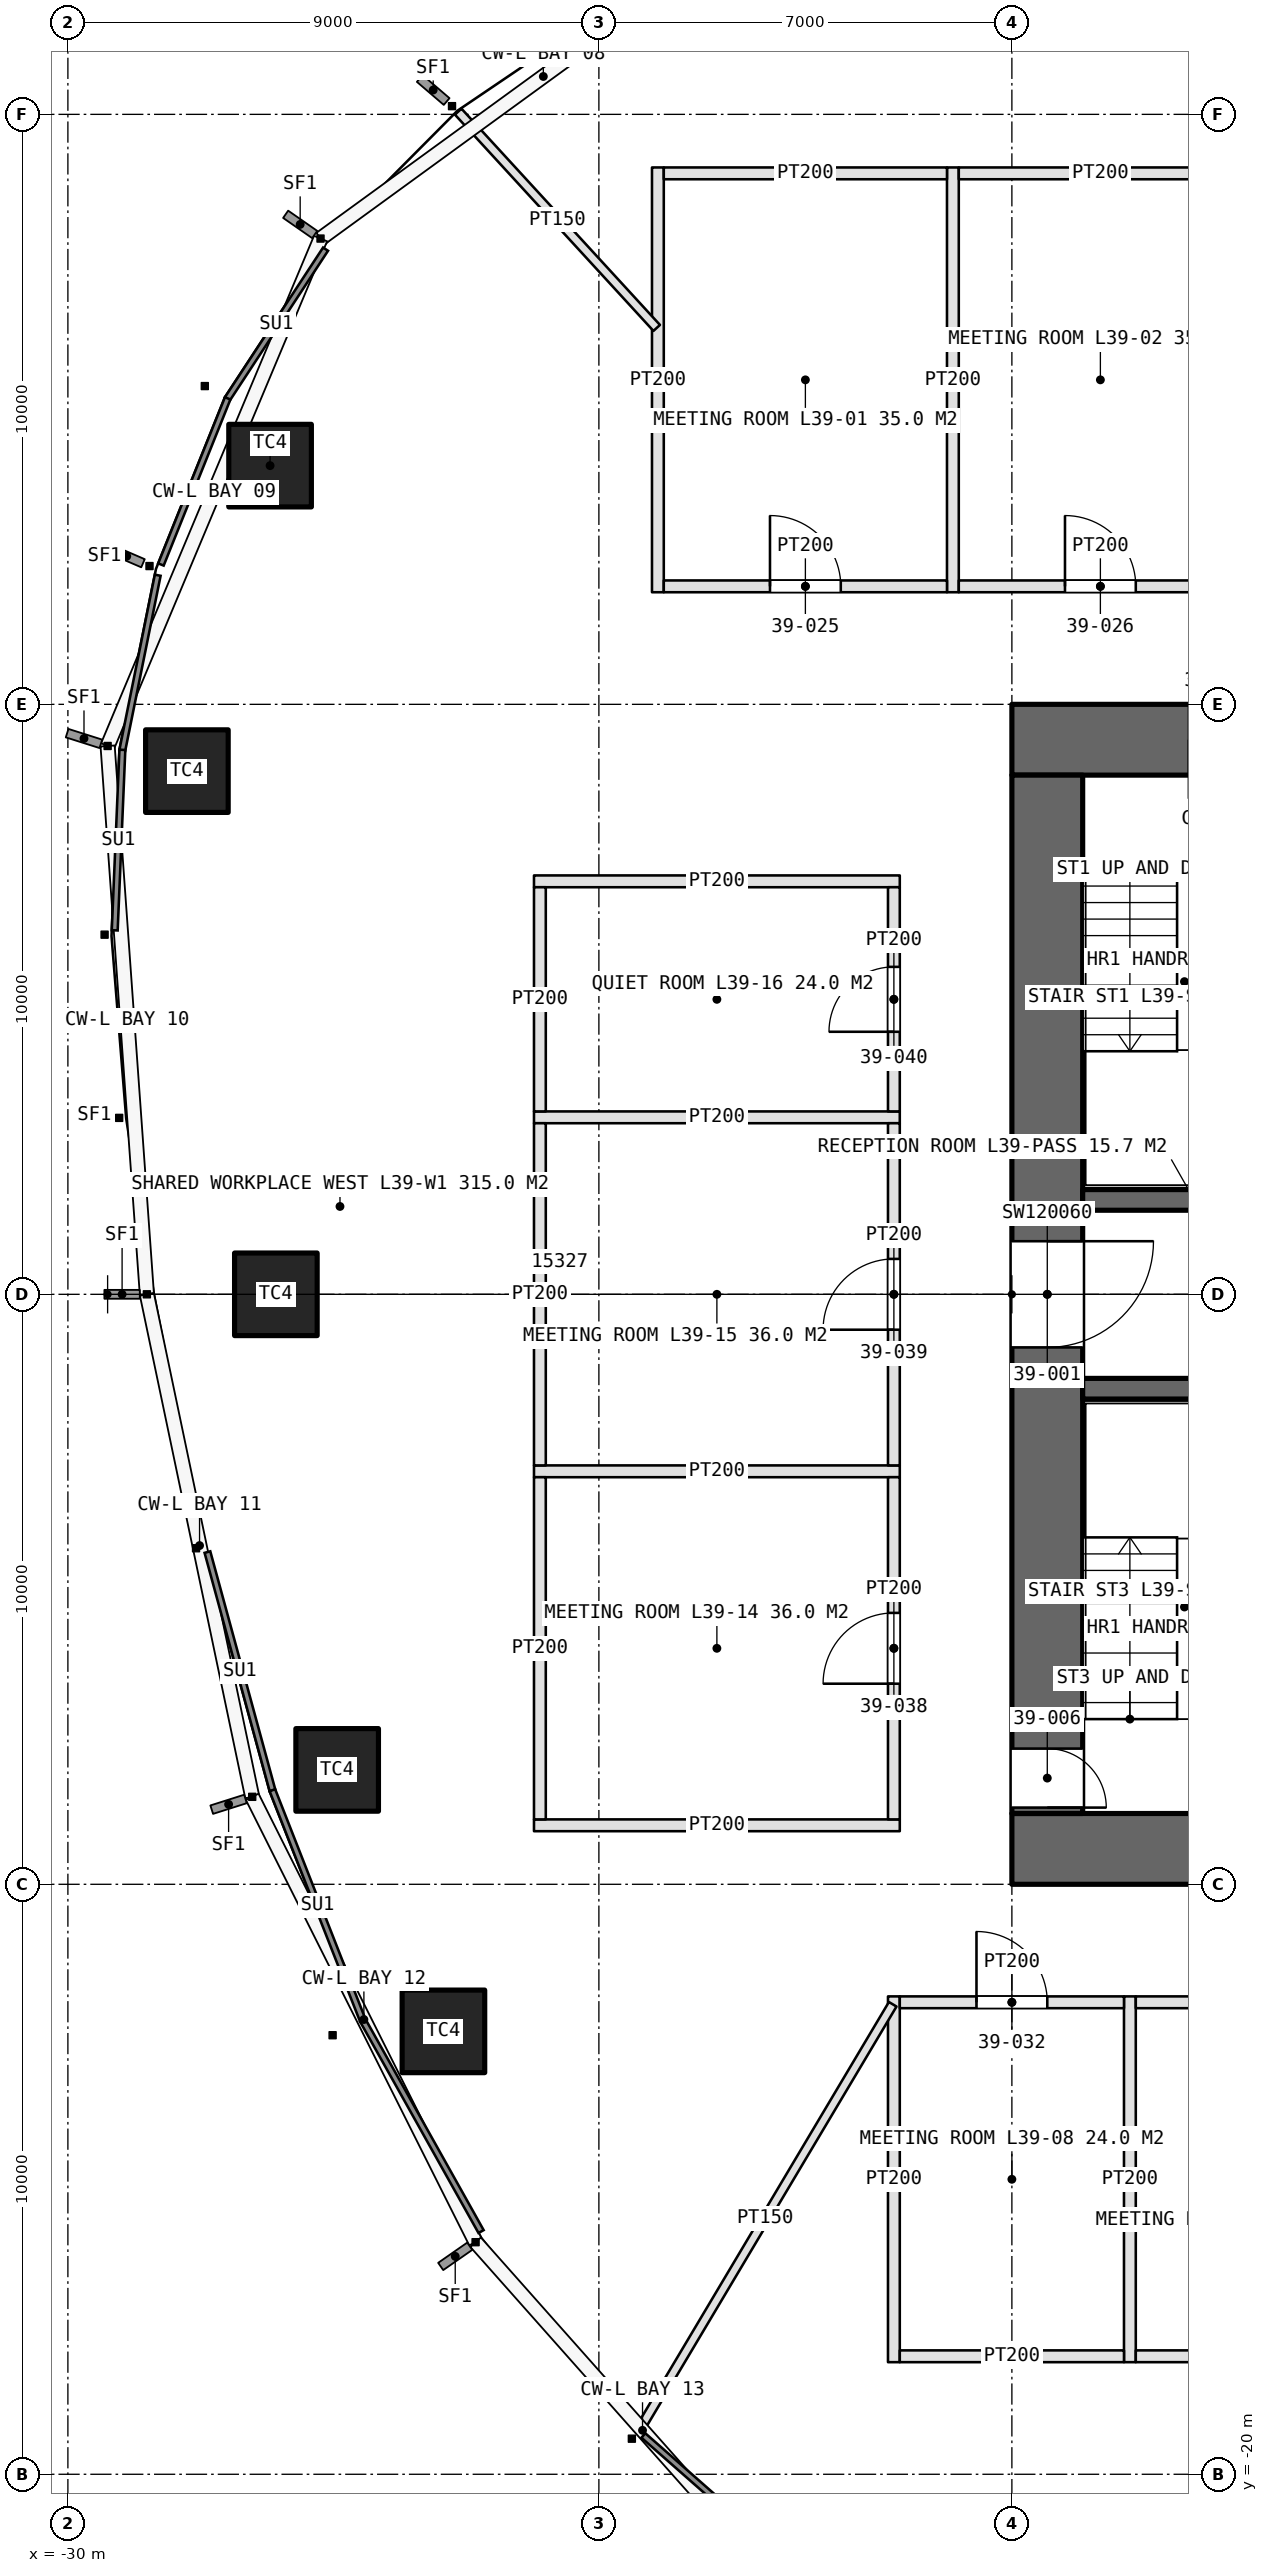
"""IFC4 building model, lengths in metres.
Left out: names, types, materials, properties, quantities, classifications, styles, units other than length and angle.
Written with IfcOpenShell. Run it as: python <this file> out.ifc"""

import sys

from ifc_helpers import new_model, si_unit, direction, frame, frame_2d, origin, origin_2d, place, context, subcontext, project, spatial, rectangle, extrude, element, fill, save


model = new_model("IFC4")
c1 = context("Model", 3, precision=1e-05, world=origin(), true_north=direction((0.0, 1.0)))
c2 = subcontext(c1, "Body", "Model", "MODEL_VIEW")
j1 = project(units=[si_unit("LENGTHUNIT", "METRE"), si_unit("PLANEANGLEUNIT", "RADIAN")], contexts=[c1])
p1 = place(None, origin())
s1 = spatial("IfcSite", under=j1, at=p1, CompositionType="ELEMENT")
p2 = place(p1, origin())
s2 = spatial("IfcBuilding", under=s1, at=p2, CompositionType="ELEMENT")
p3 = place(p2, frame((0.0, 0.0, 180.6)))
s3 = spatial("IfcBuildingStorey", under=s2, at=p3, CompositionType="ELEMENT", Elevation=180.6)
p4 = place(p3, frame((-14.0, -9.4, 0.0), z_axis=(0.0, 0.0, 1.0), x_axis=(1.0, 0.0, 0.0)))
e1 = element("IfcWall", 1, at=p4, inside=s3, PredefinedType="SHEAR", context=c2, shape_type="SweptSolid", body=[
    extrude(rectangle(XDim=28.0, YDim=1.2, at=frame_2d((14.0, 0.0))), origin(), (0.0, 0.0, 1.0), 4.2),
])
p5 = place(p4, frame((13.1, 0.0, 0.0)))
e2 = element("IfcOpeningElement", 2, at=p5, cuts=e1, PredefinedType="OPENING", context=c2, shape_type="SweptSolid", body=[
    extrude(rectangle(XDim=1.8, YDim=2.4, at=frame_2d((0.9, 1.2))), frame((0.0, 0.61, 0.0), z_axis=(0.0, -1.0, 0.0), x_axis=(1.0, 0.0, 0.0)), (0.0, 0.0, 1.0), 1.22),
])
p6 = place(p4, frame((22.9, 0.0, 0.0)))
e3 = element("IfcOpeningElement", 3, at=p6, cuts=e1, PredefinedType="OPENING", context=c2, shape_type="SweptSolid", body=[
    extrude(rectangle(XDim=2.2, YDim=2.7, at=frame_2d((1.1, 1.35))), frame((0.0, 0.61, 0.0), z_axis=(0.0, -1.0, 0.0), x_axis=(1.0, 0.0, 0.0)), (0.0, 0.0, 1.0), 1.22),
])
p7 = place(p3, frame((14.0, 9.4, 0.0), z_axis=(0.0, 0.0, 1.0), x_axis=(-1.0, 0.0, 0.0)))
e4 = element("IfcWall", 4, at=p7, inside=s3, PredefinedType="SHEAR", context=c2, shape_type="SweptSolid", body=[
    extrude(rectangle(XDim=28.0, YDim=1.2, at=frame_2d((14.0, 0.0))), origin(), (0.0, 0.0, 1.0), 4.2),
])
p8 = place(p7, frame((24.0, 0.0, 0.0)))
e5 = element("IfcOpeningElement", 5, at=p8, cuts=e4, PredefinedType="OPENING", context=c2, shape_type="SweptSolid", body=[
    extrude(rectangle(XDim=1.0, YDim=2.4, at=frame_2d((0.5, 1.2))), frame((0.0, 0.61, 0.0), z_axis=(0.0, -1.0, 0.0), x_axis=(1.0, 0.0, 0.0)), (0.0, 0.0, 1.0), 1.22),
])
p9 = place(p7, frame((13.1, 0.0, 0.0)))
e6 = element("IfcOpeningElement", 6, at=p9, cuts=e4, PredefinedType="OPENING", context=c2, shape_type="SweptSolid", body=[
    extrude(rectangle(XDim=1.8, YDim=2.4, at=frame_2d((0.9, 1.2))), frame((0.0, 0.61, 0.0), z_axis=(0.0, -1.0, 0.0), x_axis=(1.0, 0.0, 0.0)), (0.0, 0.0, 1.0), 1.22),
])
p10 = place(p3, frame((-13.4, 8.8, 0.0), z_axis=(0.0, 0.0, 1.0), x_axis=(0.0, -1.0, 0.0)))
e7 = element("IfcWall", 7, at=p10, inside=s3, PredefinedType="SHEAR", context=c2, shape_type="SweptSolid", body=[
    extrude(rectangle(XDim=17.6, YDim=1.2, at=frame_2d((8.8, 0.0))), origin(), (0.0, 0.0, 1.0), 4.2),
])
p11 = place(p10, frame((7.9, 0.0, 0.0)))
e8 = element("IfcOpeningElement", 8, at=p11, cuts=e7, PredefinedType="OPENING", context=c2, shape_type="SweptSolid", body=[
    extrude(rectangle(XDim=1.8, YDim=2.4, at=frame_2d((0.9, 1.2))), frame((0.0, 0.61, 0.0), z_axis=(0.0, -1.0, 0.0), x_axis=(1.0, 0.0, 0.0)), (0.0, 0.0, 1.0), 1.22),
])
p12 = place(p10, frame((16.5, 0.0, 0.0)))
e9 = element("IfcOpeningElement", 9, at=p12, cuts=e7, PredefinedType="OPENING", context=c2, shape_type="SweptSolid", body=[
    extrude(rectangle(XDim=1.0, YDim=2.4, at=frame_2d((0.5, 1.2))), frame((0.0, 0.61, 0.0), z_axis=(0.0, -1.0, 0.0), x_axis=(1.0, 0.0, 0.0)), (0.0, 0.0, 1.0), 1.22),
])
for number, where, z_axis, x_axis in (
    (10, (-12.8, 1.6, 0.0), (0.0, 0.0, 1.0), (1.0, 0.0, 0.0)),
    (11, (-12.8, -1.6, 0.0), (0.0, 0.0, 1.0), (1.0, 0.0, 0.0)),
):
    element("IfcWall", number, at=place(p3, frame(where, z_axis=z_axis, x_axis=x_axis)), inside=s3, PredefinedType="SHEAR", context=c2, shape_type="SweptSolid", body=[
        extrude(rectangle(XDim=5.6, YDim=0.35, at=frame_2d((2.8, 0.0))), origin(), (0.0, 0.0, 1.0), 4.2),
    ])
for number, where, z_axis, x_axis in (
    (12, (-26.573, 14.046, 0.0), (0.0, 0.0, 1.0), (1.0, 0.0, 0.0)),
    (13, (-27.983, 8.868, 0.0), (0.0, 0.0, 1.0), (1.0, 0.0, 0.0)),
    (14, (-26.475, 0.0, 0.0), (0.0, 0.0, 1.0), (1.0, 0.0, 0.0)),
    (15, (-25.436, -8.061, 0.0), (0.0, 0.0, 1.0), (1.0, 0.0, 0.0)),
    (16, (-23.635, -12.493, 0.0), (0.0, 0.0, 1.0), (1.0, 0.0, 0.0)),
):
    element("IfcColumn", number, at=place(p3, frame(where, z_axis=z_axis, x_axis=x_axis)), inside=s3, PredefinedType="COLUMN", context=c2, shape_type="SweptSolid", body=[
        extrude(rectangle(XDim=1.4, YDim=1.4, at=origin_2d()), origin(), (0.0, 0.0, 1.0), 4.2),
    ])
for number, where, z_axis, x_axis in (
    (17, (-20.0, 11.9, 0.0), (0.0, 0.0, 1.0), (0.0, 1.0, 0.0)),
    (18, (-15.0, 11.9, 0.0), (0.0, 0.0, 1.0), (0.0, 1.0, 0.0)),
):
    element("IfcWall", number, at=place(p3, frame(where, z_axis=z_axis, x_axis=x_axis)), inside=s3, PredefinedType="PARTITIONING", context=c2, shape_type="SweptSolid", body=[
        extrude(rectangle(XDim=7.2, YDim=0.2, at=frame_2d((3.6, 0.0))), origin(), (0.0, 0.0, 1.0), 3.0),
    ])
p13 = place(p3, frame((-19.9, 12.0, 0.0), z_axis=(0.0, 0.0, 1.0), x_axis=(1.0, 0.0, 0.0)))
e19 = element("IfcWall", 19, at=p13, inside=s3, PredefinedType="PARTITIONING", context=c2, shape_type="SweptSolid", body=[
    extrude(rectangle(XDim=4.8, YDim=0.2, at=frame_2d((2.4, 0.0))), origin(), (0.0, 0.0, 1.0), 3.0),
])
p14 = place(p13, frame((1.8, 0.0, 0.0)))
e20 = element("IfcOpeningElement", 20, at=p14, cuts=e19, PredefinedType="OPENING", context=c2, shape_type="SweptSolid", body=[
    extrude(rectangle(XDim=1.2, YDim=2.4, at=frame_2d((0.6, 1.2))), frame((0.0, 0.11, 0.0), z_axis=(0.0, -1.0, 0.0), x_axis=(1.0, 0.0, 0.0)), (0.0, 0.0, 1.0), 0.22),
])
p15 = place(p3, frame((-19.9, 19.0, 0.0), z_axis=(0.0, 0.0, 1.0), x_axis=(1.0, 0.0, 0.0)))
e21 = element("IfcWall", 21, at=p15, inside=s3, PredefinedType="PARTITIONING", context=c2, shape_type="SweptSolid", body=[
    extrude(rectangle(XDim=4.8, YDim=0.2, at=frame_2d((2.4, 0.0))), origin(), (0.0, 0.0, 1.0), 3.0),
])
p16 = place(p3, frame((-14.9, 12.0, 0.0), z_axis=(0.0, 0.0, 1.0), x_axis=(1.0, 0.0, 0.0)))
e22 = element("IfcWall", 22, at=p16, inside=s3, PredefinedType="PARTITIONING", context=c2, shape_type="SweptSolid", body=[
    extrude(rectangle(XDim=4.8, YDim=0.2, at=frame_2d((2.4, 0.0))), origin(), (0.0, 0.0, 1.0), 3.0),
])
p17 = place(p16, frame((1.8, 0.0, 0.0)))
e23 = element("IfcOpeningElement", 23, at=p17, cuts=e22, PredefinedType="OPENING", context=c2, shape_type="SweptSolid", body=[
    extrude(rectangle(XDim=1.2, YDim=2.4, at=frame_2d((0.6, 1.2))), frame((0.0, 0.11, 0.0), z_axis=(0.0, -1.0, 0.0), x_axis=(1.0, 0.0, 0.0)), (0.0, 0.0, 1.0), 0.22),
])
p18 = place(p3, frame((-14.9, 19.0, 0.0), z_axis=(0.0, 0.0, 1.0), x_axis=(1.0, 0.0, 0.0)))
e24 = element("IfcWall", 24, at=p18, inside=s3, PredefinedType="PARTITIONING", context=c2, shape_type="SweptSolid", body=[
    extrude(rectangle(XDim=4.8, YDim=0.2, at=frame_2d((2.4, 0.0))), origin(), (0.0, 0.0, 1.0), 3.0),
])
for number, where, z_axis, x_axis in (
    (25, (-16.0, -11.9, 0.0), (0.0, 0.0, 1.0), (0.0, -1.0, 0.0)),
    (26, (-12.0, -11.9, 0.0), (0.0, 0.0, 1.0), (0.0, -1.0, 0.0)),
):
    element("IfcWall", number, at=place(p3, frame(where, z_axis=z_axis, x_axis=x_axis)), inside=s3, PredefinedType="PARTITIONING", context=c2, shape_type="SweptSolid", body=[
        extrude(rectangle(XDim=6.2, YDim=0.2, at=frame_2d((3.1, 0.0))), origin(), (0.0, 0.0, 1.0), 3.0),
    ])
p19 = place(p3, frame((-15.9, -12.0, 0.0), z_axis=(0.0, 0.0, 1.0), x_axis=(1.0, 0.0, 0.0)))
e27 = element("IfcWall", 27, at=p19, inside=s3, PredefinedType="PARTITIONING", context=c2, shape_type="SweptSolid", body=[
    extrude(rectangle(XDim=3.8, YDim=0.2, at=frame_2d((1.9, 0.0))), origin(), (0.0, 0.0, 1.0), 3.0),
])
p20 = place(p19, frame((1.3, 0.0, 0.0)))
e28 = element("IfcOpeningElement", 28, at=p20, cuts=e27, PredefinedType="OPENING", context=c2, shape_type="SweptSolid", body=[
    extrude(rectangle(XDim=1.2, YDim=2.4, at=frame_2d((0.6, 1.2))), frame((0.0, 0.11, 0.0), z_axis=(0.0, -1.0, 0.0), x_axis=(1.0, 0.0, 0.0)), (0.0, 0.0, 1.0), 0.22),
])
p21 = place(p3, frame((-15.9, -18.0, 0.0), z_axis=(0.0, 0.0, 1.0), x_axis=(1.0, 0.0, 0.0)))
e29 = element("IfcWall", 29, at=p21, inside=s3, PredefinedType="PARTITIONING", context=c2, shape_type="SweptSolid", body=[
    extrude(rectangle(XDim=3.8, YDim=0.2, at=frame_2d((1.9, 0.0))), origin(), (0.0, 0.0, 1.0), 3.0),
])
p22 = place(p3, frame((-11.9, -12.0, 0.0), z_axis=(0.0, 0.0, 1.0), x_axis=(1.0, 0.0, 0.0)))
e30 = element("IfcWall", 30, at=p22, inside=s3, PredefinedType="PARTITIONING", context=c2, shape_type="SweptSolid", body=[
    extrude(rectangle(XDim=3.8, YDim=0.2, at=frame_2d((1.9, 0.0))), origin(), (0.0, 0.0, 1.0), 3.0),
])
p23 = place(p22, frame((1.3, 0.0, 0.0)))
e31 = element("IfcOpeningElement", 31, at=p23, cuts=e30, PredefinedType="OPENING", context=c2, shape_type="SweptSolid", body=[
    extrude(rectangle(XDim=1.2, YDim=2.4, at=frame_2d((0.6, 1.2))), frame((0.0, 0.11, 0.0), z_axis=(0.0, -1.0, 0.0), x_axis=(1.0, 0.0, 0.0)), (0.0, 0.0, 1.0), 0.22),
])
p24 = place(p3, frame((-11.9, -18.0, 0.0), z_axis=(0.0, 0.0, 1.0), x_axis=(1.0, 0.0, 0.0)))
e32 = element("IfcWall", 32, at=p24, inside=s3, PredefinedType="PARTITIONING", context=c2, shape_type="SweptSolid", body=[
    extrude(rectangle(XDim=3.8, YDim=0.2, at=frame_2d((1.9, 0.0))), origin(), (0.0, 0.0, 1.0), 3.0),
])
for number, where, z_axis, x_axis in (
    (33, (-15.9, -9.0, 0.0), (0.0, 0.0, 1.0), (-1.0, 0.0, 0.0)),
    (34, (-15.9, -3.0, 0.0), (0.0, 0.0, 1.0), (-1.0, 0.0, 0.0)),
    (35, (-15.9, 3.0, 0.0), (0.0, 0.0, 1.0), (-1.0, 0.0, 0.0)),
    (36, (-15.9, 7.0, 0.0), (0.0, 0.0, 1.0), (-1.0, 0.0, 0.0)),
):
    element("IfcWall", number, at=place(p3, frame(where, z_axis=z_axis, x_axis=x_axis)), inside=s3, PredefinedType="PARTITIONING", context=c2, shape_type="SweptSolid", body=[
        extrude(rectangle(XDim=6.2, YDim=0.2, at=frame_2d((3.1, 0.0))), origin(), (0.0, 0.0, 1.0), 3.0),
    ])
p25 = place(p3, frame((-16.0, -8.9, 0.0), z_axis=(0.0, 0.0, 1.0), x_axis=(0.0, 1.0, 0.0)))
e37 = element("IfcWall", 37, at=p25, inside=s3, PredefinedType="PARTITIONING", context=c2, shape_type="SweptSolid", body=[
    extrude(rectangle(XDim=5.8, YDim=0.2, at=frame_2d((2.9, 0.0))), origin(), (0.0, 0.0, 1.0), 3.0),
])
p26 = place(p25, frame((2.3, 0.0, 0.0)))
e38 = element("IfcOpeningElement", 38, at=p26, cuts=e37, PredefinedType="OPENING", context=c2, shape_type="SweptSolid", body=[
    extrude(rectangle(XDim=1.2, YDim=2.4, at=frame_2d((0.6, 1.2))), frame((0.0, 0.11, 0.0), z_axis=(0.0, -1.0, 0.0), x_axis=(1.0, 0.0, 0.0)), (0.0, 0.0, 1.0), 0.22),
])
p27 = place(p3, frame((-22.0, -8.9, 0.0), z_axis=(0.0, 0.0, 1.0), x_axis=(0.0, 1.0, 0.0)))
e39 = element("IfcWall", 39, at=p27, inside=s3, PredefinedType="PARTITIONING", context=c2, shape_type="SweptSolid", body=[
    extrude(rectangle(XDim=5.8, YDim=0.2, at=frame_2d((2.9, 0.0))), origin(), (0.0, 0.0, 1.0), 3.0),
])
p28 = place(p3, frame((-16.0, -2.9, 0.0), z_axis=(0.0, 0.0, 1.0), x_axis=(0.0, 1.0, 0.0)))
e40 = element("IfcWall", 40, at=p28, inside=s3, PredefinedType="PARTITIONING", context=c2, shape_type="SweptSolid", body=[
    extrude(rectangle(XDim=5.8, YDim=0.2, at=frame_2d((2.9, 0.0))), origin(), (0.0, 0.0, 1.0), 3.0),
])
p29 = place(p28, frame((2.3, 0.0, 0.0)))
e41 = element("IfcOpeningElement", 41, at=p29, cuts=e40, PredefinedType="OPENING", context=c2, shape_type="SweptSolid", body=[
    extrude(rectangle(XDim=1.2, YDim=2.4, at=frame_2d((0.6, 1.2))), frame((0.0, 0.11, 0.0), z_axis=(0.0, -1.0, 0.0), x_axis=(1.0, 0.0, 0.0)), (0.0, 0.0, 1.0), 0.22),
])
p30 = place(p3, frame((-22.0, -2.9, 0.0), z_axis=(0.0, 0.0, 1.0), x_axis=(0.0, 1.0, 0.0)))
e42 = element("IfcWall", 42, at=p30, inside=s3, PredefinedType="PARTITIONING", context=c2, shape_type="SweptSolid", body=[
    extrude(rectangle(XDim=5.8, YDim=0.2, at=frame_2d((2.9, 0.0))), origin(), (0.0, 0.0, 1.0), 3.0),
])
p31 = place(p3, frame((-16.0, 3.1, 0.0), z_axis=(0.0, 0.0, 1.0), x_axis=(0.0, 1.0, 0.0)))
e43 = element("IfcWall", 43, at=p31, inside=s3, PredefinedType="PARTITIONING", context=c2, shape_type="SweptSolid", body=[
    extrude(rectangle(XDim=3.8, YDim=0.2, at=frame_2d((1.9, 0.0))), origin(), (0.0, 0.0, 1.0), 3.0),
])
p32 = place(p31, frame((1.35, 0.0, 0.0)))
e44 = element("IfcOpeningElement", 44, at=p32, cuts=e43, PredefinedType="OPENING", context=c2, shape_type="SweptSolid", body=[
    extrude(rectangle(XDim=1.1, YDim=2.3, at=frame_2d((0.55, 1.15))), frame((0.0, 0.11, 0.0), z_axis=(0.0, -1.0, 0.0), x_axis=(1.0, 0.0, 0.0)), (0.0, 0.0, 1.0), 0.22),
])
p33 = place(p3, frame((-22.0, 3.1, 0.0), z_axis=(0.0, 0.0, 1.0), x_axis=(0.0, 1.0, 0.0)))
e45 = element("IfcWall", 45, at=p33, inside=s3, PredefinedType="PARTITIONING", context=c2, shape_type="SweptSolid", body=[
    extrude(rectangle(XDim=3.8, YDim=0.2, at=frame_2d((1.9, 0.0))), origin(), (0.0, 0.0, 1.0), 3.0),
])
p34 = place(p3, frame((-16.02, -12.034, 0.0), z_axis=(0.0, 0.0, 1.0), x_axis=(-0.511518902153, -0.859272024879, 0.0)))
e46 = element("IfcWall", 46, at=p34, inside=s3, PredefinedType="PARTITIONING", context=c2, shape_type="SweptSolid", body=[
    extrude(rectangle(XDim=8.451, YDim=0.15, at=frame_2d((4.226, 0.0))), origin(), (0.0, 0.0, 1.0), 3.0),
])
p35 = place(p3, frame((-20.02, 16.38, 0.0), z_axis=(0.0, 0.0, 1.0), x_axis=(-0.676159982548, 0.736754828963, 0.0)))
e47 = element("IfcWall", 47, at=p35, inside=s3, PredefinedType="PARTITIONING", context=c2, shape_type="SweptSolid", body=[
    extrude(rectangle(XDim=4.976, YDim=0.15, at=frame_2d((2.488, 0.0))), origin(), (0.0, 0.0, 1.0), 3.0),
])
p36 = place(p11, origin())
e48 = element("IfcDoor", 48, at=p36, inside=s3, OperationType="DOUBLE_DOOR_SINGLE_SWING", PredefinedType="DOOR", context=c2, shape_type="SweptSolid", body=[
    extrude(rectangle(XDim=1.8, YDim=2.4, at=frame_2d((0.9, 1.2))), frame((0.0, 0.025, 0.0), z_axis=(0.0, -1.0, 0.0), x_axis=(1.0, 0.0, 0.0)), (0.0, 0.0, 1.0), 0.05),
])
fill(e8, e48)
p37 = place(p12, origin())
e49 = element("IfcDoor", 49, at=p37, inside=s3, OperationType="SINGLE_SWING_RIGHT", PredefinedType="DOOR", context=c2, shape_type="SweptSolid", body=[
    extrude(rectangle(XDim=1.0, YDim=2.4, at=frame_2d((0.5, 1.2))), frame((0.0, 0.025, 0.0), z_axis=(0.0, -1.0, 0.0), x_axis=(1.0, 0.0, 0.0)), (0.0, 0.0, 1.0), 0.05),
])
fill(e9, e49)
p38 = place(p14, origin())
e50 = element("IfcDoor", 50, at=p38, inside=s3, OperationType="SINGLE_SWING_LEFT", PredefinedType="DOOR", context=c2, shape_type="SweptSolid", body=[
    extrude(rectangle(XDim=1.2, YDim=2.4, at=frame_2d((0.6, 1.2))), frame((0.0, 0.025, 0.0), z_axis=(0.0, -1.0, 0.0), x_axis=(1.0, 0.0, 0.0)), (0.0, 0.0, 1.0), 0.05),
])
fill(e20, e50)
p39 = place(p17, origin())
e51 = element("IfcDoor", 51, at=p39, inside=s3, OperationType="SINGLE_SWING_LEFT", PredefinedType="DOOR", context=c2, shape_type="SweptSolid", body=[
    extrude(rectangle(XDim=1.2, YDim=2.4, at=frame_2d((0.6, 1.2))), frame((0.0, 0.025, 0.0), z_axis=(0.0, -1.0, 0.0), x_axis=(1.0, 0.0, 0.0)), (0.0, 0.0, 1.0), 0.05),
])
fill(e23, e51)
p40 = place(p20, origin())
e52 = element("IfcDoor", 52, at=p40, inside=s3, OperationType="SINGLE_SWING_LEFT", PredefinedType="DOOR", context=c2, shape_type="SweptSolid", body=[
    extrude(rectangle(XDim=1.2, YDim=2.4, at=frame_2d((0.6, 1.2))), frame((0.0, 0.025, 0.0), z_axis=(0.0, -1.0, 0.0), x_axis=(1.0, 0.0, 0.0)), (0.0, 0.0, 1.0), 0.05),
])
fill(e28, e52)
p41 = place(p26, origin())
e53 = element("IfcDoor", 53, at=p41, inside=s3, OperationType="SINGLE_SWING_LEFT", PredefinedType="DOOR", context=c2, shape_type="SweptSolid", body=[
    extrude(rectangle(XDim=1.2, YDim=2.4, at=frame_2d((0.6, 1.2))), frame((0.0, 0.025, 0.0), z_axis=(0.0, -1.0, 0.0), x_axis=(1.0, 0.0, 0.0)), (0.0, 0.0, 1.0), 0.05),
])
fill(e38, e53)
p42 = place(p29, origin())
e54 = element("IfcDoor", 54, at=p42, inside=s3, OperationType="SINGLE_SWING_LEFT", PredefinedType="DOOR", context=c2, shape_type="SweptSolid", body=[
    extrude(rectangle(XDim=1.2, YDim=2.4, at=frame_2d((0.6, 1.2))), frame((0.0, 0.025, 0.0), z_axis=(0.0, -1.0, 0.0), x_axis=(1.0, 0.0, 0.0)), (0.0, 0.0, 1.0), 0.05),
])
fill(e41, e54)
p43 = place(p32, origin())
e55 = element("IfcDoor", 55, at=p43, inside=s3, OperationType="SINGLE_SWING_LEFT", PredefinedType="DOOR", context=c2, shape_type="SweptSolid", body=[
    extrude(rectangle(XDim=1.1, YDim=2.3, at=frame_2d((0.55, 1.15))), frame((0.0, 0.025, 0.0), z_axis=(0.0, -1.0, 0.0), x_axis=(1.0, 0.0, 0.0)), (0.0, 0.0, 1.0), 0.05),
])
fill(e44, e55)
save(model, sys.argv[1])
